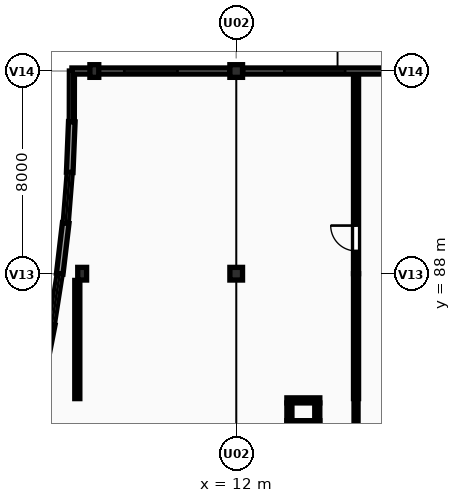
"""IFC4 building model, lengths in metres.
Left out: names, types, materials, properties, quantities, classifications, styles, units other than length and angle.
Written with IfcOpenShell. Run it as: python <this file> out.ifc"""

import sys

from ifc_helpers import new_model, si_unit, direction, frame, frame_2d, origin, origin_2d, place, context, subcontext, project, spatial, rectangle, extrude, element, fill, save


model = new_model("IFC4")
c1 = context("Model", 3, precision=1e-05, world=origin(), true_north=direction((0.0, 1.0)))
c2 = subcontext(c1, "Body", "Model", "MODEL_VIEW")
j1 = project(units=[si_unit("LENGTHUNIT", "METRE"), si_unit("PLANEANGLEUNIT", "RADIAN")], contexts=[c1])
p1 = place(None, origin())
s1 = spatial("IfcSite", under=j1, at=p1, CompositionType="ELEMENT")
p2 = place(p1, origin())
s2 = spatial("IfcBuilding", under=s1, at=p2, CompositionType="ELEMENT")
p3 = place(p2, origin())
s3 = spatial("IfcBuildingStorey", under=s2, at=p3, CompositionType="ELEMENT", Elevation=0.0)
for number, where, z_axis, x_axis in (
    (1, (5.92, 88.0, -0.2), (0.0, 0.0, 1.0), (1.0, 0.0, 0.0)),
    (2, (6.4, 96.0, -0.2), (0.0, 0.0, 1.0), (1.0, 0.0, 0.0)),
):
    element("IfcColumn", number, at=place(p3, frame(where, z_axis=z_axis, x_axis=x_axis)), inside=s3, PredefinedType="PILASTER", context=c2, shape_type="SweptSolid", body=[
        extrude(rectangle(XDim=0.35, YDim=0.5, at=origin_2d()), origin(), (0.0, 0.0, 1.0), 4.7),
    ])
for number, where, z_axis, x_axis in (
    (3, (12.0, 88.0, -0.2), (0.0, 0.0, 1.0), (1.0, 0.0, 0.0)),
    (4, (12.0, 96.0, -0.2), (0.0, 0.0, 1.0), (1.0, 0.0, 0.0)),
):
    element("IfcColumn", number, at=place(p3, frame(where, z_axis=z_axis, x_axis=x_axis)), inside=s3, PredefinedType="COLUMN", context=c2, shape_type="SweptSolid", body=[
        extrude(rectangle(XDim=0.5, YDim=0.5, at=origin_2d()), origin(), (0.0, 0.0, 1.0), 4.7),
    ])
p4 = place(p3, frame((4.33, 84.0, 0.0), z_axis=(0.0, 0.0, 1.0), x_axis=(0.192152065658, 0.981365163262, 0.0)))
e5 = element("IfcWall", 5, at=p4, inside=s3, PredefinedType="SOLIDWALL", context=c2, shape_type="SweptSolid", body=[
    extrude(rectangle(XDim=2.038, YDim=0.26, at=frame_2d((1.019, 0.0))), origin(), (0.0, 0.0, 1.0), 4.24),
])
p5 = place(p3, frame((4.722, 86.0, 0.0), z_axis=(0.0, 0.0, 1.0), x_axis=(0.15473004848, 0.987956786554, 0.0)))
e6 = element("IfcWall", 6, at=p5, inside=s3, PredefinedType="SOLIDWALL", context=c2, shape_type="SweptSolid", body=[
    extrude(rectangle(XDim=2.024, YDim=0.2, at=frame_2d((1.012, 0.0))), origin(), (0.0, 0.0, 1.0), 0.95),
])
p6 = place(p3, frame((5.035, 88.0, 0.0), z_axis=(0.0, 0.0, 1.0), x_axis=(0.116988959085, 0.99313321536, 0.0)))
e7 = element("IfcWall", 7, at=p6, inside=s3, PredefinedType="SOLIDWALL", context=c2, shape_type="SweptSolid", body=[
    extrude(rectangle(XDim=2.014, YDim=0.26, at=frame_2d((1.007, 0.0))), origin(), (0.0, 0.0, 1.0), 4.24),
])
p7 = place(p3, frame((5.271, 90.0, 0.0), z_axis=(0.0, 0.0, 1.0), x_axis=(0.079097106354, 0.996866915775, 0.0)))
e8 = element("IfcWall", 8, at=p7, inside=s3, PredefinedType="SOLIDWALL", context=c2, shape_type="SweptSolid", body=[
    extrude(rectangle(XDim=2.006, YDim=0.2, at=frame_2d((1.003, 0.0))), origin(), (0.0, 0.0, 1.0), 0.95),
])
p8 = place(p3, frame((5.429, 92.0, 0.0), z_axis=(0.0, 0.0, 1.0), x_axis=(0.04061587159, 0.999174835039, 0.0)))
e9 = element("IfcWall", 9, at=p8, inside=s3, PredefinedType="SOLIDWALL", context=c2, shape_type="SweptSolid", body=[
    extrude(rectangle(XDim=2.002, YDim=0.26, at=frame_2d((1.001, 0.0))), origin(), (0.0, 0.0, 1.0), 4.24),
])
p9 = place(p3, frame((5.51, 94.0, 0.0), z_axis=(0.0, 0.0, 1.0), x_axis=(0.002197260321, 0.999997586021, 0.0)))
e10 = element("IfcWall", 10, at=p9, inside=s3, PredefinedType="SOLIDWALL", context=c2, shape_type="SweptSolid", body=[
    extrude(rectangle(XDim=2.0, YDim=0.2, at=frame_2d((1.0, 0.0))), origin(), (0.0, 0.0, 1.0), 0.95),
])
p10 = place(p3, frame((5.515, 96.0, 0.0), z_axis=(0.0, 0.0, 1.0), x_axis=(1.0, 0.0, 0.0)))
e11 = element("IfcWall", 11, at=p10, inside=s3, PredefinedType="SOLIDWALL", context=c2, shape_type="SweptSolid", body=[
    extrude(rectangle(XDim=6.235, YDim=0.24, at=frame_2d((3.118, 0.0))), origin(), (0.0, 0.0, 1.0), 3.59),
])
p11 = place(p10, frame((2.067, 0.0, 0.95)))
e12 = element("IfcOpeningElement", 12, at=p11, cuts=e11, PredefinedType="OPENING", context=c2, shape_type="SweptSolid", body=[
    extrude(rectangle(XDim=2.1, YDim=1.35, at=frame_2d((1.05, 0.675))), frame((0.0, 0.13, 0.0), z_axis=(0.0, -1.0, 0.0), x_axis=(1.0, 0.0, 0.0)), (0.0, 0.0, 1.0), 0.26),
])
p12 = place(p3, frame((12.25, 96.0, 0.0), z_axis=(0.0, 0.0, 1.0), x_axis=(1.0, 0.0, 0.0)))
e13 = element("IfcWall", 13, at=p12, inside=s3, PredefinedType="SOLIDWALL", context=c2, shape_type="SweptSolid", body=[
    extrude(rectangle(XDim=7.5, YDim=0.24, at=frame_2d((3.75, 0.0))), origin(), (0.0, 0.0, 1.0), 3.59),
])
p13 = place(p12, frame((1.65, 0.0, 0.95)))
e14 = element("IfcOpeningElement", 14, at=p13, cuts=e13, PredefinedType="OPENING", context=c2, shape_type="SweptSolid", body=[
    extrude(rectangle(XDim=2.4, YDim=1.35, at=frame_2d((1.2, 0.675))), frame((0.0, 0.13, 0.0), z_axis=(0.0, -1.0, 0.0), x_axis=(1.0, 0.0, 0.0)), (0.0, 0.0, 1.0), 0.26),
])
for number, where, z_axis, x_axis in (
    (15, (15.3, 82.1, 0.0), (0.0, 0.0, 1.0), (-1.0, 0.0, 0.0)),
    (16, (14.0, 83.0, 0.0), (0.0, 0.0, 1.0), (1.0, 0.0, 0.0)),
):
    element("IfcWall", number, at=place(p3, frame(where, z_axis=z_axis, x_axis=x_axis)), inside=s3, PredefinedType="PARTITIONING", context=c2, shape_type="SweptSolid", body=[
        extrude(rectangle(XDim=1.3, YDim=0.2, at=frame_2d((0.65, 0.0))), origin(), (0.0, 0.0, 1.0), 4.24),
    ])
for number, where, z_axis, x_axis in (
    (17, (14.1, 82.2, 0.0), (0.0, 0.0, 1.0), (0.0, 1.0, 0.0)),
    (18, (15.2, 82.9, 0.0), (0.0, 0.0, 1.0), (0.0, -1.0, 0.0)),
):
    element("IfcWall", number, at=place(p3, frame(where, z_axis=z_axis, x_axis=x_axis)), inside=s3, PredefinedType="PARTITIONING", context=c2, shape_type="SweptSolid", body=[
        extrude(rectangle(XDim=0.7, YDim=0.2, at=frame_2d((0.35, 0.0))), origin(), (0.0, 0.0, 1.0), 4.24),
    ])
p14 = place(p3, frame((16.73, 80.0, 0.0), z_axis=(0.0, 0.0, 1.0), x_axis=(0.0, 1.0, 0.0)))
e19 = element("IfcWall", 19, at=p14, inside=s3, PredefinedType="PARTITIONING", context=c2, shape_type="SweptSolid", body=[
    extrude(rectangle(XDim=2.93, YDim=0.16, at=frame_2d((1.465, 0.0))), origin(), (0.0, 0.0, 1.0), 4.24),
])
p15 = place(p3, frame((5.728, 83.07, 0.0), z_axis=(0.0, 0.0, 1.0), x_axis=(0.0, 1.0, 0.0)))
e20 = element("IfcWall", 20, at=p15, inside=s3, PredefinedType="PARTITIONING", context=c2, shape_type="SweptSolid", body=[
    extrude(rectangle(XDim=4.665, YDim=0.2, at=frame_2d((2.333, 0.0))), origin(), (0.0, 0.0, 1.0), 3.54),
])
p16 = place(p3, frame((16.73, 83.07, 0.0), z_axis=(0.0, 0.0, 1.0), x_axis=(0.0, 1.0, 0.0)))
e21 = element("IfcWall", 21, at=p16, inside=s3, PredefinedType="PARTITIONING", context=c2, shape_type="SweptSolid", body=[
    extrude(rectangle(XDim=4.93, YDim=0.2, at=frame_2d((2.465, 0.0))), origin(), (0.0, 0.0, 1.0), 4.24),
])
p17 = place(p3, frame((16.73, 88.0, 0.0), z_axis=(0.0, 0.0, 1.0), x_axis=(0.0, 1.0, 0.0)))
e22 = element("IfcWall", 22, at=p17, inside=s3, PredefinedType="PARTITIONING", context=c2, shape_type="SweptSolid", body=[
    extrude(rectangle(XDim=7.838, YDim=0.2, at=frame_2d((3.919, 0.0))), origin(), (0.0, 0.0, 1.0), 4.24),
])
p18 = place(p17, frame((0.9, 0.0, 0.0)))
e23 = element("IfcOpeningElement", 23, at=p18, cuts=e22, PredefinedType="OPENING", context=c2, shape_type="SweptSolid", body=[
    extrude(rectangle(XDim=1.0, YDim=2.15, at=frame_2d((0.5, 1.075))), frame((0.0, 0.11, 0.0), z_axis=(0.0, -1.0, 0.0), x_axis=(1.0, 0.0, 0.0)), (0.0, 0.0, 1.0), 0.22),
])
p19 = place(p11, origin())
e24 = element("IfcWindow", 24, at=p19, inside=s3, PartitioningType="DOUBLE_PANEL_VERTICAL", PredefinedType="WINDOW", context=c2, shape_type="SweptSolid", body=[
    extrude(rectangle(XDim=2.1, YDim=1.35, at=frame_2d((1.05, 0.675))), frame((0.0, 0.03, 0.0), z_axis=(0.0, -1.0, 0.0), x_axis=(1.0, 0.0, 0.0)), (0.0, 0.0, 1.0), 0.06),
])
fill(e12, e24)
p20 = place(p13, origin())
e25 = element("IfcWindow", 25, at=p20, inside=s3, PartitioningType="DOUBLE_PANEL_VERTICAL", PredefinedType="WINDOW", context=c2, shape_type="SweptSolid", body=[
    extrude(rectangle(XDim=2.4, YDim=1.35, at=frame_2d((1.2, 0.675))), frame((0.0, 0.03, 0.0), z_axis=(0.0, -1.0, 0.0), x_axis=(1.0, 0.0, 0.0)), (0.0, 0.0, 1.0), 0.06),
])
fill(e14, e25)
p21 = place(p18, origin())
e26 = element("IfcDoor", 26, at=p21, inside=s3, OperationType="SINGLE_SWING_RIGHT", PredefinedType="DOOR", context=c2, shape_type="SweptSolid", body=[
    extrude(rectangle(XDim=1.0, YDim=2.15, at=frame_2d((0.5, 1.075))), frame((0.0, 0.025, 0.0), z_axis=(0.0, -1.0, 0.0), x_axis=(1.0, 0.0, 0.0)), (0.0, 0.0, 1.0), 0.05),
])
fill(e23, e26)
save(model, sys.argv[1])
